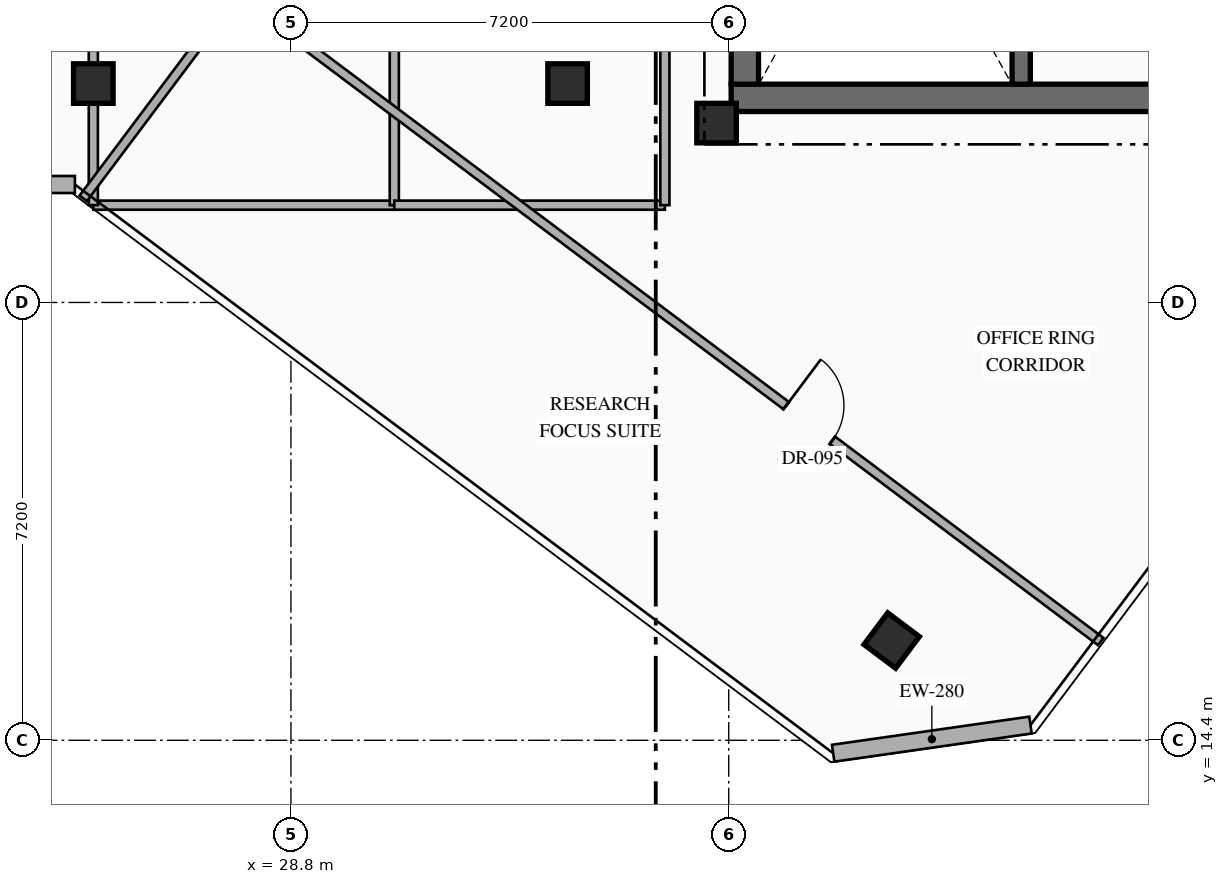
"""IFC4 building model, lengths in metres.
Left out: names, types, materials, properties, quantities, classifications, styles, units other than length and angle.
Written with IfcOpenShell. Run it as: python <this file> out.ifc"""

import sys

from ifc_helpers import new_model, si_unit, direction, frame, frame_2d, origin, origin_2d, place, context, subcontext, project, spatial, rectangle, hollow_rectangle, extrude, element, fill, save


model = new_model("IFC4")
c1 = context("Model", 3, precision=1e-05, world=origin(), true_north=direction((0.0, 1.0)))
c2 = subcontext(c1, "Body", "Model", "MODEL_VIEW")
j1 = project(units=[si_unit("LENGTHUNIT", "METRE"), si_unit("PLANEANGLEUNIT", "RADIAN")], contexts=[c1])
p1 = place(None, origin())
s1 = spatial("IfcSite", under=j1, at=p1, CompositionType="ELEMENT")
p2 = place(p1, origin())
s2 = spatial("IfcBuilding", under=s1, at=p2, CompositionType="ELEMENT")
p3 = place(p2, frame((0.0, 0.0, 246.75)))
s3 = spatial("IfcBuildingStorey", under=s2, at=p3, CompositionType="ELEMENT", Elevation=246.75)
p4 = place(p3, frame((36.04, 24.965, 0.0), z_axis=(0.0, 0.0, 1.0), x_axis=(1.0, 0.0, 0.0)))
e1 = element("IfcWall", 1, at=p4, inside=s3, PredefinedType="SHEAR", context=c2, shape_type="SweptSolid", body=[
    extrude(rectangle(XDim=7.46, YDim=0.45, at=frame_2d((3.73, 0.0))), origin(), (0.0, 0.0, 1.0), 3.6),
])
p5 = place(p3, frame((36.265, 25.19, 0.0), z_axis=(0.0, 0.0, 1.0), x_axis=(0.0, 1.0, 0.0)))
e2 = element("IfcWall", 2, at=p5, inside=s3, PredefinedType="SHEAR", context=c2, shape_type="SweptSolid", body=[
    extrude(rectangle(XDim=9.48, YDim=0.45, at=frame_2d((4.74, 0.0))), origin(), (0.0, 0.0, 1.0), 3.6),
])
p6 = place(p3, frame((40.81, 25.19, 0.0), z_axis=(0.0, 0.0, 1.0), x_axis=(0.0, 1.0, 0.0)))
e3 = element("IfcWall", 3, at=p6, inside=s3, PredefinedType="SHEAR", context=c2, shape_type="SweptSolid", body=[
    extrude(rectangle(XDim=9.48, YDim=0.3, at=frame_2d((4.74, 0.0))), origin(), (0.0, 0.0, 1.0), 3.6),
])
for number, where, z_axis, x_axis in (
    (4, (35.8, 24.55, 0.0), (0.0, 0.0, 1.0), (1.0, 0.0, 0.0)),
    (5, (25.55, 25.2, 0.0), (0.0, 0.0, 1.0), (1.0, 0.0, 0.0)),
    (6, (33.35, 25.2, 0.0), (0.0, 0.0, 1.0), (1.0, 0.0, 0.0)),
    (7, (38.68, 16.04, 0.0), (0.0, 0.0, 1.0), (0.8, -0.6, 0.0)),
):
    element("IfcColumn", number, at=place(p3, frame(where, z_axis=z_axis, x_axis=x_axis)), inside=s3, PredefinedType="COLUMN", context=c2, shape_type="SweptSolid", body=[
        extrude(hollow_rectangle(XDim=0.65, YDim=0.65, WallThickness=0.025, at=origin_2d()), origin(), (0.0, 0.0, 1.0), 3.6),
    ])
p7 = place(p3, frame((40.963, 14.65, 0.0), z_axis=(0.0, 0.0, 1.0), x_axis=(-0.989977778067, -0.141223223777, 0.0)))
e8 = element("IfcWall", 8, at=p7, inside=s3, PredefinedType="STANDARD", context=c2, shape_type="SweptSolid", body=[
    extrude(rectangle(XDim=3.278, YDim=0.28, at=frame_2d((1.639, 0.0))), origin(), (0.0, 0.0, 1.0), 3.35),
])
p8 = place(p3, frame((25.247, 23.54, 0.0), z_axis=(0.0, 0.0, 1.0), x_axis=(-1.0, 0.0, 0.0)))
e9 = element("IfcWall", 9, at=p8, inside=s3, PredefinedType="STANDARD", context=c2, shape_type="SweptSolid", body=[
    extrude(rectangle(XDim=4.789, YDim=0.28, at=frame_2d((2.395, 0.0))), origin(), (0.0, 0.0, 1.0), 3.35),
])
p9 = place(p3, frame((25.55, 23.2, 0.0), z_axis=(0.0, 0.0, 1.0), x_axis=(1.0, 0.0, 0.0)))
e10 = element("IfcWall", 10, at=p9, inside=s3, PredefinedType="PARTITIONING", context=c2, shape_type="SweptSolid", body=[
    extrude(rectangle(XDim=4.95, YDim=0.15, at=frame_2d((2.475, 0.0))), origin(), (0.0, 0.0, 1.0), 3.35),
])
p10 = place(p3, frame((25.55, 23.2, 0.0), z_axis=(0.0, 0.0, 1.0), x_axis=(0.0, 1.0, 0.0)))
e11 = element("IfcWall", 11, at=p10, inside=s3, PredefinedType="PARTITIONING", context=c2, shape_type="SweptSolid", body=[
    extrude(rectangle(XDim=7.15, YDim=0.15, at=frame_2d((3.575, 0.0))), origin(), (0.0, 0.0, 1.0), 2.757),
])
p11 = place(p3, frame((30.5, 23.2, 0.0), z_axis=(0.0, 0.0, 1.0), x_axis=(0.0, 1.0, 0.0)))
e12 = element("IfcWall", 12, at=p11, inside=s3, PredefinedType="PARTITIONING", context=c2, shape_type="SweptSolid", body=[
    extrude(rectangle(XDim=7.15, YDim=0.15, at=frame_2d((3.575, 0.0))), origin(), (0.0, 0.0, 1.0), 3.35),
])
p12 = place(p3, frame((30.5, 23.2, 0.0), z_axis=(0.0, 0.0, 1.0), x_axis=(1.0, 0.0, 0.0)))
e13 = element("IfcWall", 13, at=p12, inside=s3, PredefinedType="PARTITIONING", context=c2, shape_type="SweptSolid", body=[
    extrude(rectangle(XDim=4.45, YDim=0.15, at=frame_2d((2.225, 0.0))), origin(), (0.0, 0.0, 1.0), 3.35),
])
p13 = place(p3, frame((34.95, 23.2, 0.0), z_axis=(0.0, 0.0, 1.0), x_axis=(0.0, 1.0, 0.0)))
e14 = element("IfcWall", 14, at=p13, inside=s3, PredefinedType="PARTITIONING", context=c2, shape_type="SweptSolid", body=[
    extrude(rectangle(XDim=7.15, YDim=0.15, at=frame_2d((3.575, 0.0))), origin(), (0.0, 0.0, 1.0), 3.35),
])
p14 = place(p3, frame((27.91, 26.68, 0.0), z_axis=(0.0, 0.0, 1.0), x_axis=(0.8, -0.6, 0.0)))
e15 = element("IfcWall", 15, at=p14, inside=s3, PredefinedType="PARTITIONING", context=c2, shape_type="SweptSolid", body=[
    extrude(rectangle(XDim=17.76, YDim=0.15, at=frame_2d((8.88, 0.0))), origin(), (0.0, 0.0, 1.0), 3.35),
])
p15 = place(p14, frame((11.294, 0.0, 0.0)))
e16 = element("IfcOpeningElement", 16, at=p15, cuts=e15, PredefinedType="OPENING", context=c2, shape_type="SweptSolid", body=[
    extrude(rectangle(XDim=0.95, YDim=2.15, at=frame_2d((0.475, 1.075))), frame((0.0, 0.085, 0.0), z_axis=(0.0, -1.0, 0.0), x_axis=(1.0, 0.0, 0.0)), (0.0, 0.0, 1.0), 0.17),
])
p16 = place(p3, frame((25.384, 23.312, 0.0), z_axis=(0.0, 0.0, 1.0), x_axis=(0.599990721155, 0.80000695905, 0.0)))
e17 = element("IfcWall", 17, at=p16, inside=s3, PredefinedType="PARTITIONING", context=c2, shape_type="SweptSolid", body=[
    extrude(rectangle(XDim=4.21, YDim=0.15, at=frame_2d((2.105, 0.0))), origin(), (0.0, 0.0, 1.0), 3.35),
])
p17 = place(p15, origin())
e18 = element("IfcDoor", 18, at=p17, inside=s3, OperationType="SINGLE_SWING_LEFT", PredefinedType="DOOR", context=c2, shape_type="SweptSolid", body=[
    extrude(rectangle(XDim=0.95, YDim=2.15, at=frame_2d((0.475, 1.075))), frame((0.0, 0.025, 0.0), z_axis=(0.0, -1.0, 0.0), x_axis=(1.0, 0.0, 0.0)), (0.0, 0.0, 1.0), 0.05),
])
fill(e16, e18)
save(model, sys.argv[1])
